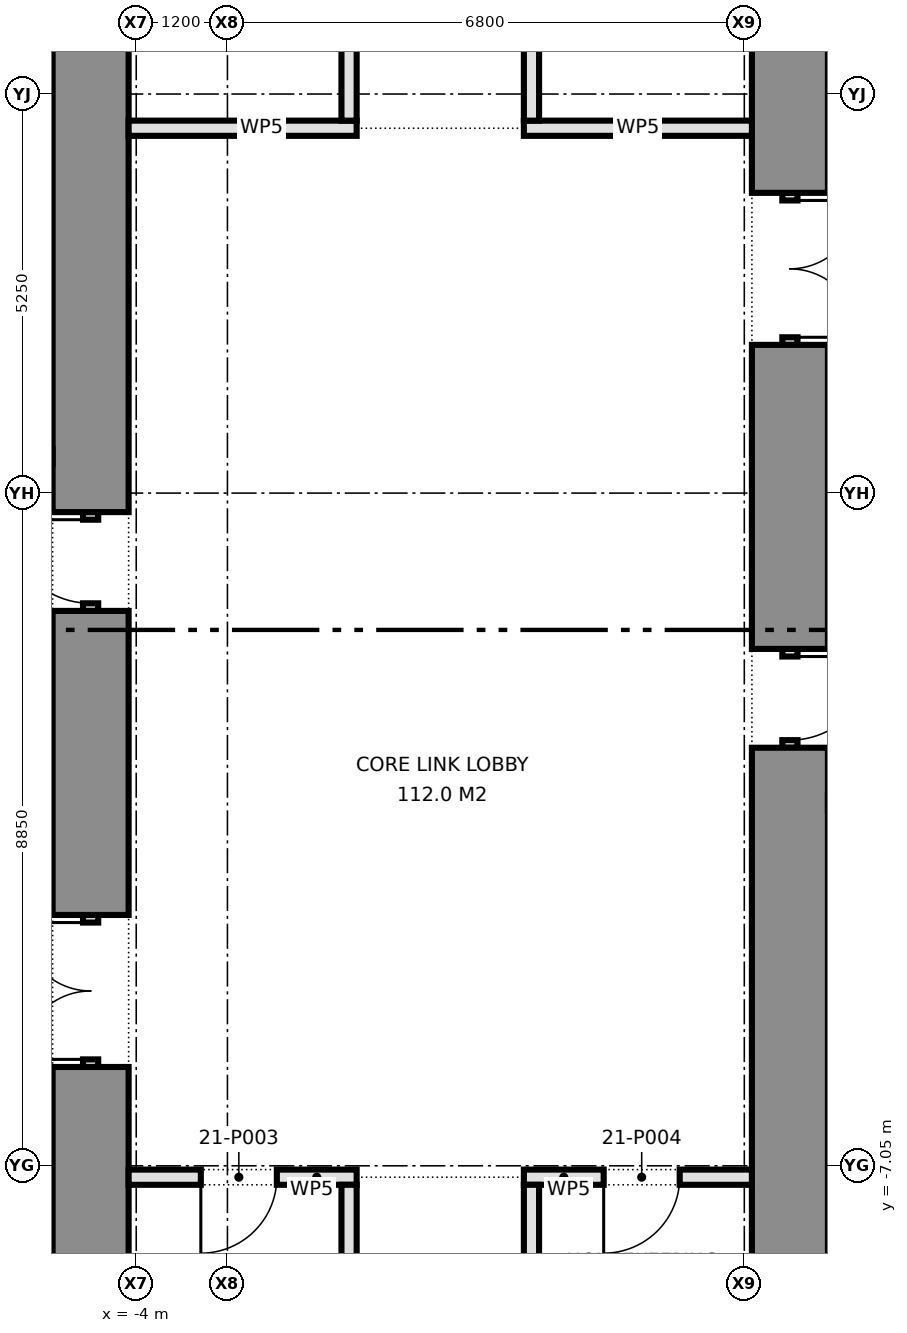
"""IFC4 building model, lengths in metres.
Left out: names, types, materials, properties, quantities, classifications, styles, units other than length and angle.
Written with IfcOpenShell. Run it as: python <this file> out.ifc"""

import sys

from ifc_helpers import new_model, si_unit, direction, frame, frame_2d, origin, place, context, subcontext, project, spatial, rectangle, extrude, element, fill, save


model = new_model("IFC4")
c1 = context("Model", 3, precision=1e-05, world=origin(), true_north=direction((0.0, 1.0)))
c2 = subcontext(c1, "Body", "Model", "MODEL_VIEW")
j1 = project(units=[si_unit("LENGTHUNIT", "METRE"), si_unit("PLANEANGLEUNIT", "RADIAN")], contexts=[c1])
p1 = place(None, origin())
s1 = spatial("IfcSite", under=j1, at=p1, CompositionType="ELEMENT")
p2 = place(p1, origin())
s2 = spatial("IfcBuilding", under=s1, at=p2, CompositionType="ELEMENT")
p3 = place(p2, frame((0.0, 0.0, 95.2)))
s3 = spatial("IfcBuildingStorey", under=s2, at=p3, CompositionType="ELEMENT", Elevation=95.2)
p4 = place(p3, frame((-4.6, -8.9, 0.0), z_axis=(0.0, 0.0, 1.0), x_axis=(0.0, 1.0, 0.0)))
e1 = element("IfcWall", 1, at=p4, inside=s3, PredefinedType="SHEAR", context=c2, shape_type="SweptSolid", body=[
    extrude(rectangle(XDim=3.15, YDim=1.0, at=frame_2d((1.575, 0.0))), origin(), (0.0, 0.0, 1.0), 4.2),
])
p5 = place(p3, frame((-4.6, -5.75, 0.0), z_axis=(0.0, 0.0, 1.0), x_axis=(0.0, 1.0, 0.0)))
e2 = element("IfcWall", 2, at=p5, inside=s3, PredefinedType="PARTITIONING", context=c2, shape_type="SweptSolid", body=[
    extrude(rectangle(XDim=2.0, YDim=0.2, at=frame_2d((1.0, 0.0))), origin(), (0.0, 0.0, 1.0), 2.4),
])
p6 = place(p5, frame((0.1, 0.0, 0.0)))
e3 = element("IfcOpeningElement", 3, at=p6, cuts=e2, PredefinedType="OPENING", context=c2, shape_type="SweptSolid", body=[
    extrude(rectangle(XDim=1.8, YDim=2.1, at=frame_2d((0.9, 1.05))), frame((0.0, 0.11, 0.0), z_axis=(0.0, -1.0, 0.0), x_axis=(1.0, 0.0, 0.0)), (0.0, 0.0, 1.0), 0.22),
])
p7 = place(p3, frame((-4.6, -3.75, 0.0), z_axis=(0.0, 0.0, 1.0), x_axis=(0.0, 1.0, 0.0)))
e4 = element("IfcWall", 4, at=p7, inside=s3, PredefinedType="SHEAR", context=c2, shape_type="SweptSolid", body=[
    extrude(rectangle(XDim=4.0, YDim=1.0, at=frame_2d((2.0, 0.0))), origin(), (0.0, 0.0, 1.0), 4.2),
])
p8 = place(p3, frame((-4.6, 0.25, 0.0), z_axis=(0.0, 0.0, 1.0), x_axis=(0.0, 1.0, 0.0)))
e5 = element("IfcWall", 5, at=p8, inside=s3, PredefinedType="PARTITIONING", context=c2, shape_type="SweptSolid", body=[
    extrude(rectangle(XDim=1.3, YDim=0.2, at=frame_2d((0.65, 0.0))), origin(), (0.0, 0.0, 1.0), 2.4),
])
p9 = place(p8, frame((0.1, 0.0, 0.0)))
e6 = element("IfcOpeningElement", 6, at=p9, cuts=e5, PredefinedType="OPENING", context=c2, shape_type="SweptSolid", body=[
    extrude(rectangle(XDim=1.1, YDim=2.1, at=frame_2d((0.55, 1.05))), frame((0.0, 0.11, 0.0), z_axis=(0.0, -1.0, 0.0), x_axis=(1.0, 0.0, 0.0)), (0.0, 0.0, 1.0), 0.22),
])
p10 = place(p3, frame((-4.6, 1.55, 0.0), z_axis=(0.0, 0.0, 1.0), x_axis=(0.0, 1.0, 0.0)))
e7 = element("IfcWall", 7, at=p10, inside=s3, PredefinedType="SHEAR", context=c2, shape_type="SweptSolid", body=[
    extrude(rectangle(XDim=7.35, YDim=1.0, at=frame_2d((3.675, 0.0))), origin(), (0.0, 0.0, 1.0), 4.2),
])
p11 = place(p3, frame((4.6, 8.9, 0.0), z_axis=(0.0, 0.0, 1.0), x_axis=(0.0, -1.0, 0.0)))
e8 = element("IfcWall", 8, at=p11, inside=s3, PredefinedType="SHEAR", context=c2, shape_type="SweptSolid", body=[
    extrude(rectangle(XDim=3.15, YDim=1.0, at=frame_2d((1.575, 0.0))), origin(), (0.0, 0.0, 1.0), 4.2),
])
p12 = place(p3, frame((4.6, 5.75, 0.0), z_axis=(0.0, 0.0, 1.0), x_axis=(0.0, -1.0, 0.0)))
e9 = element("IfcWall", 9, at=p12, inside=s3, PredefinedType="PARTITIONING", context=c2, shape_type="SweptSolid", body=[
    extrude(rectangle(XDim=2.0, YDim=0.2, at=frame_2d((1.0, 0.0))), origin(), (0.0, 0.0, 1.0), 2.4),
])
p13 = place(p12, frame((0.1, 0.0, 0.0)))
e10 = element("IfcOpeningElement", 10, at=p13, cuts=e9, PredefinedType="OPENING", context=c2, shape_type="SweptSolid", body=[
    extrude(rectangle(XDim=1.8, YDim=2.1, at=frame_2d((0.9, 1.05))), frame((0.0, 0.11, 0.0), z_axis=(0.0, -1.0, 0.0), x_axis=(1.0, 0.0, 0.0)), (0.0, 0.0, 1.0), 0.22),
])
p14 = place(p3, frame((4.6, 3.75, 0.0), z_axis=(0.0, 0.0, 1.0), x_axis=(0.0, -1.0, 0.0)))
e11 = element("IfcWall", 11, at=p14, inside=s3, PredefinedType="SHEAR", context=c2, shape_type="SweptSolid", body=[
    extrude(rectangle(XDim=4.0, YDim=1.0, at=frame_2d((2.0, 0.0))), origin(), (0.0, 0.0, 1.0), 4.2),
])
p15 = place(p3, frame((4.6, -0.25, 0.0), z_axis=(0.0, 0.0, 1.0), x_axis=(0.0, -1.0, 0.0)))
e12 = element("IfcWall", 12, at=p15, inside=s3, PredefinedType="PARTITIONING", context=c2, shape_type="SweptSolid", body=[
    extrude(rectangle(XDim=1.3, YDim=0.2, at=frame_2d((0.65, 0.0))), origin(), (0.0, 0.0, 1.0), 2.4),
])
p16 = place(p15, frame((0.1, 0.0, 0.0)))
e13 = element("IfcOpeningElement", 13, at=p16, cuts=e12, PredefinedType="OPENING", context=c2, shape_type="SweptSolid", body=[
    extrude(rectangle(XDim=1.1, YDim=2.1, at=frame_2d((0.55, 1.05))), frame((0.0, 0.11, 0.0), z_axis=(0.0, -1.0, 0.0), x_axis=(1.0, 0.0, 0.0)), (0.0, 0.0, 1.0), 0.22),
])
p17 = place(p3, frame((4.6, -1.55, 0.0), z_axis=(0.0, 0.0, 1.0), x_axis=(0.0, -1.0, 0.0)))
e14 = element("IfcWall", 14, at=p17, inside=s3, PredefinedType="SHEAR", context=c2, shape_type="SweptSolid", body=[
    extrude(rectangle(XDim=7.35, YDim=1.0, at=frame_2d((3.675, 0.0))), origin(), (0.0, 0.0, 1.0), 4.2),
])
p18 = place(p3, frame((-4.1, -7.2, 0.0), z_axis=(0.0, 0.0, 1.0), x_axis=(1.0, 0.0, 0.0)))
e15 = element("IfcWall", 15, at=p18, inside=s3, PredefinedType="PARTITIONING", context=c2, shape_type="SweptSolid", body=[
    extrude(rectangle(XDim=3.0, YDim=0.2, at=frame_2d((1.5, 0.0))), origin(), (0.0, 0.0, 1.0), 4.2),
])
p19 = place(p18, frame((0.95, 0.0, 0.0)))
e16 = element("IfcOpeningElement", 16, at=p19, cuts=e15, PredefinedType="OPENING", context=c2, shape_type="SweptSolid", body=[
    extrude(rectangle(XDim=1.0, YDim=2.1, at=frame_2d((0.5, 1.05))), frame((0.0, 0.11, 0.0), z_axis=(0.0, -1.0, 0.0), x_axis=(1.0, 0.0, 0.0)), (0.0, 0.0, 1.0), 0.22),
])
p20 = place(p3, frame((1.1, -7.2, 0.0), z_axis=(0.0, 0.0, 1.0), x_axis=(1.0, 0.0, 0.0)))
e17 = element("IfcWall", 17, at=p20, inside=s3, PredefinedType="PARTITIONING", context=c2, shape_type="SweptSolid", body=[
    extrude(rectangle(XDim=3.0, YDim=0.2, at=frame_2d((1.5, 0.0))), origin(), (0.0, 0.0, 1.0), 4.2),
])
p21 = place(p20, frame((1.05, 0.0, 0.0)))
e18 = element("IfcOpeningElement", 18, at=p21, cuts=e17, PredefinedType="OPENING", context=c2, shape_type="SweptSolid", body=[
    extrude(rectangle(XDim=1.0, YDim=2.1, at=frame_2d((0.5, 1.05))), frame((0.0, 0.11, 0.0), z_axis=(0.0, -1.0, 0.0), x_axis=(1.0, 0.0, 0.0)), (0.0, 0.0, 1.0), 0.22),
])
for number, where, z_axis, x_axis in (
    (19, (-4.1, 6.6, 0.0), (0.0, 0.0, 1.0), (1.0, 0.0, 0.0)),
    (20, (1.1, 6.6, 0.0), (0.0, 0.0, 1.0), (1.0, 0.0, 0.0)),
):
    element("IfcWall", number, at=place(p3, frame(where, z_axis=z_axis, x_axis=x_axis)), inside=s3, PredefinedType="PARTITIONING", context=c2, shape_type="SweptSolid", body=[
        extrude(rectangle(XDim=3.0, YDim=0.2, at=frame_2d((1.5, 0.0))), origin(), (0.0, 0.0, 1.0), 4.2),
    ])
p22 = place(p3, frame((1.2, -9.8, 0.0), z_axis=(0.0, 0.0, 1.0), x_axis=(0.0, 1.0, 0.0)))
e21 = element("IfcWall", 21, at=p22, inside=s3, PredefinedType="PARTITIONING", context=c2, shape_type="SweptSolid", body=[
    extrude(rectangle(XDim=2.5, YDim=0.2, at=frame_2d((1.25, 0.0))), origin(), (0.0, 0.0, 1.0), 4.2),
])
p23 = place(p3, frame((1.2, 6.7, 0.0), z_axis=(0.0, 0.0, 1.0), x_axis=(0.0, 1.0, 0.0)))
e22 = element("IfcWall", 22, at=p23, inside=s3, PredefinedType="PARTITIONING", context=c2, shape_type="SweptSolid", body=[
    extrude(rectangle(XDim=3.1, YDim=0.2, at=frame_2d((1.55, 0.0))), origin(), (0.0, 0.0, 1.0), 4.2),
])
p24 = place(p23, frame((1.05, 0.0, 0.0)))
e23 = element("IfcOpeningElement", 23, at=p24, cuts=e22, PredefinedType="OPENING", context=c2, shape_type="SweptSolid", body=[
    extrude(rectangle(XDim=1.0, YDim=2.1, at=frame_2d((0.5, 1.05))), frame((0.0, 0.11, 0.0), z_axis=(0.0, -1.0, 0.0), x_axis=(1.0, 0.0, 0.0)), (0.0, 0.0, 1.0), 0.22),
])
p25 = place(p3, frame((-1.2, -9.8, 0.0), z_axis=(0.0, 0.0, 1.0), x_axis=(0.0, 1.0, 0.0)))
e24 = element("IfcWall", 24, at=p25, inside=s3, PredefinedType="PARTITIONING", context=c2, shape_type="SweptSolid", body=[
    extrude(rectangle(XDim=2.5, YDim=0.2, at=frame_2d((1.25, 0.0))), origin(), (0.0, 0.0, 1.0), 4.2),
])
p26 = place(p3, frame((-1.2, 6.7, 0.0), z_axis=(0.0, 0.0, 1.0), x_axis=(0.0, 1.0, 0.0)))
e25 = element("IfcWall", 25, at=p26, inside=s3, PredefinedType="PARTITIONING", context=c2, shape_type="SweptSolid", body=[
    extrude(rectangle(XDim=3.1, YDim=0.2, at=frame_2d((1.55, 0.0))), origin(), (0.0, 0.0, 1.0), 4.2),
])
p27 = place(p26, frame((1.05, 0.0, 0.0)))
e26 = element("IfcOpeningElement", 26, at=p27, cuts=e25, PredefinedType="OPENING", context=c2, shape_type="SweptSolid", body=[
    extrude(rectangle(XDim=1.0, YDim=2.1, at=frame_2d((0.5, 1.05))), frame((0.0, 0.11, 0.0), z_axis=(0.0, -1.0, 0.0), x_axis=(1.0, 0.0, 0.0)), (0.0, 0.0, 1.0), 0.22),
])
p28 = place(p6, origin())
e27 = element("IfcDoor", 27, at=p28, inside=s3, OperationType="DOUBLE_DOOR_SINGLE_SWING", PredefinedType="DOOR", context=c2, shape_type="SweptSolid", body=[
    extrude(rectangle(XDim=1.8, YDim=2.1, at=frame_2d((0.9, 1.05))), frame((0.0, 0.025, 0.0), z_axis=(0.0, -1.0, 0.0), x_axis=(1.0, 0.0, 0.0)), (0.0, 0.0, 1.0), 0.05),
])
fill(e3, e27)
p29 = place(p9, origin())
e28 = element("IfcDoor", 28, at=p29, inside=s3, OperationType="SINGLE_SWING_RIGHT", PredefinedType="DOOR", context=c2, shape_type="SweptSolid", body=[
    extrude(rectangle(XDim=1.1, YDim=2.1, at=frame_2d((0.55, 1.05))), frame((0.0, 0.025, 0.0), z_axis=(0.0, -1.0, 0.0), x_axis=(1.0, 0.0, 0.0)), (0.0, 0.0, 1.0), 0.05),
])
fill(e6, e28)
p30 = place(p13, origin())
e29 = element("IfcDoor", 29, at=p30, inside=s3, OperationType="DOUBLE_DOOR_SINGLE_SWING", PredefinedType="DOOR", context=c2, shape_type="SweptSolid", body=[
    extrude(rectangle(XDim=1.8, YDim=2.1, at=frame_2d((0.9, 1.05))), frame((0.0, 0.025, 0.0), z_axis=(0.0, -1.0, 0.0), x_axis=(1.0, 0.0, 0.0)), (0.0, 0.0, 1.0), 0.05),
])
fill(e10, e29)
p31 = place(p16, origin())
e30 = element("IfcDoor", 30, at=p31, inside=s3, OperationType="SINGLE_SWING_LEFT", PredefinedType="DOOR", context=c2, shape_type="SweptSolid", body=[
    extrude(rectangle(XDim=1.1, YDim=2.1, at=frame_2d((0.55, 1.05))), frame((0.0, 0.025, 0.0), z_axis=(0.0, -1.0, 0.0), x_axis=(1.0, 0.0, 0.0)), (0.0, 0.0, 1.0), 0.05),
])
fill(e13, e30)
p32 = place(p19, frame((1.0, 0.0, 0.0), z_axis=(0.0, 0.0, 1.0), x_axis=(-1.0, 0.0, 0.0)))
e31 = element("IfcDoor", 31, at=p32, inside=s3, OperationType="SINGLE_SWING_RIGHT", PredefinedType="DOOR", context=c2, shape_type="SweptSolid", body=[
    extrude(rectangle(XDim=1.0, YDim=2.1, at=frame_2d((0.5, 1.05))), frame((0.0, 0.025, 0.0), z_axis=(0.0, -1.0, 0.0), x_axis=(1.0, 0.0, 0.0)), (0.0, 0.0, 1.0), 0.05),
])
fill(e16, e31)
p33 = place(p21, frame((1.0, 0.0, 0.0), z_axis=(0.0, 0.0, 1.0), x_axis=(-1.0, 0.0, 0.0)))
e32 = element("IfcDoor", 32, at=p33, inside=s3, OperationType="SINGLE_SWING_RIGHT", PredefinedType="DOOR", context=c2, shape_type="SweptSolid", body=[
    extrude(rectangle(XDim=1.0, YDim=2.1, at=frame_2d((0.5, 1.05))), frame((0.0, 0.025, 0.0), z_axis=(0.0, -1.0, 0.0), x_axis=(1.0, 0.0, 0.0)), (0.0, 0.0, 1.0), 0.05),
])
fill(e18, e32)
save(model, sys.argv[1])
